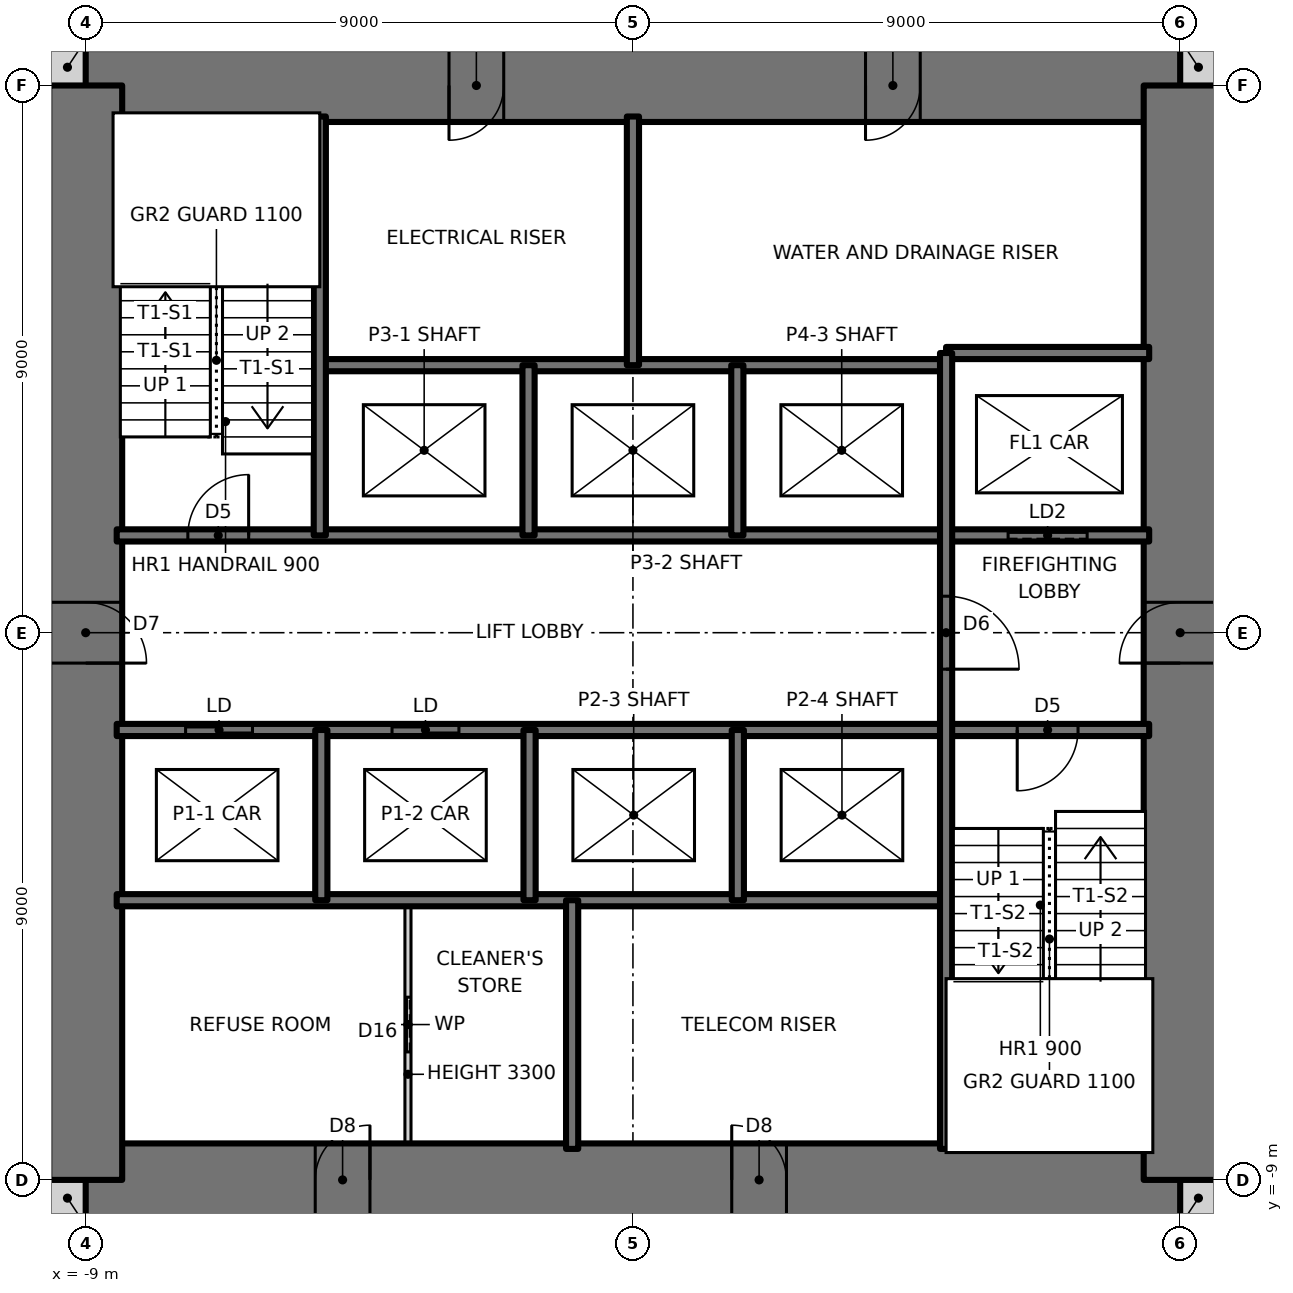
"""IFC4 building model, lengths in metres.
Left out: names, types, materials, properties, quantities, classifications, styles, units other than length and angle.
Written with IfcOpenShell. Run it as: python <this file> out.ifc"""

import sys

from ifc_helpers import new_model, si_unit, direction, frame, frame_2d, origin, place, context, subcontext, project, spatial, rectangle, extrude, element, fill, save


model = new_model("IFC4")
c1 = context("Model", 3, precision=1e-05, world=origin(), true_north=direction((0.0, 1.0)))
c2 = subcontext(c1, "Body", "Model", "MODEL_VIEW")
j1 = project(units=[si_unit("LENGTHUNIT", "METRE"), si_unit("PLANEANGLEUNIT", "RADIAN")], contexts=[c1])
p1 = place(None, origin())
s1 = spatial("IfcSite", under=j1, at=p1, CompositionType="ELEMENT")
p2 = place(p1, origin())
s2 = spatial("IfcBuilding", under=s1, at=p2, CompositionType="ELEMENT")
p3 = place(p2, frame((0.0, 0.0, 60.5)))
s3 = spatial("IfcBuildingStorey", under=s2, at=p3, CompositionType="ELEMENT", Elevation=60.5)
for number, where, z_axis, x_axis in (
    (1, (-9.6, -9.3, 0.0), (0.0, 0.0, 1.0), (1.0, 0.0, 0.0)),
    (2, (9.0, -9.3, 0.0), (0.0, 0.0, 1.0), (1.0, 0.0, 0.0)),
    (3, (9.0, 9.3, 0.0), (0.0, 0.0, 1.0), (1.0, 0.0, 0.0)),
    (4, (-9.6, 9.3, 0.0), (0.0, 0.0, 1.0), (1.0, 0.0, 0.0)),
):
    element("IfcWall", number, at=place(p3, frame(where, z_axis=z_axis, x_axis=x_axis)), inside=s3, PredefinedType="SOLIDWALL", context=c2, shape_type="SweptSolid", body=[
        extrude(rectangle(XDim=0.6, YDim=0.6, at=frame_2d((0.3, 0.0))), origin(), (0.0, 0.0, 1.0), 3.5),
    ])
p4 = place(p3, frame((-9.0, -9.0, 0.0), z_axis=(0.0, 0.0, 1.0), x_axis=(1.0, 0.0, 0.0)))
e5 = element("IfcWall", 5, at=p4, inside=s3, PredefinedType="SHEAR", context=c2, shape_type="SweptSolid", body=[
    extrude(rectangle(XDim=18.0, YDim=1.2, at=frame_2d((9.0, 0.0))), origin(), (0.0, 0.0, 1.0), 3.5),
])
p5 = place(p4, frame((3.775, 0.0, 0.0)))
e6 = element("IfcOpeningElement", 6, at=p5, cuts=e5, PredefinedType="OPENING", context=c2, shape_type="SweptSolid", body=[
    extrude(rectangle(XDim=0.9, YDim=2.1, at=frame_2d((0.45, 1.05))), frame((0.0, 0.61, 0.0), z_axis=(0.0, -1.0, 0.0), x_axis=(1.0, 0.0, 0.0)), (0.0, 0.0, 1.0), 1.22),
])
p6 = place(p4, frame((10.625, 0.0, 0.0)))
e7 = element("IfcOpeningElement", 7, at=p6, cuts=e5, PredefinedType="OPENING", context=c2, shape_type="SweptSolid", body=[
    extrude(rectangle(XDim=0.9, YDim=2.1, at=frame_2d((0.45, 1.05))), frame((0.0, 0.61, 0.0), z_axis=(0.0, -1.0, 0.0), x_axis=(1.0, 0.0, 0.0)), (0.0, 0.0, 1.0), 1.22),
])
p7 = place(p3, frame((9.0, 9.0, 0.0), z_axis=(0.0, 0.0, 1.0), x_axis=(-1.0, 0.0, 0.0)))
e8 = element("IfcWall", 8, at=p7, inside=s3, PredefinedType="SHEAR", context=c2, shape_type="SweptSolid", body=[
    extrude(rectangle(XDim=18.0, YDim=1.2, at=frame_2d((9.0, 0.0))), origin(), (0.0, 0.0, 1.0), 3.5),
])
p8 = place(p7, frame((11.125, 0.0, 0.0)))
e9 = element("IfcOpeningElement", 9, at=p8, cuts=e8, PredefinedType="OPENING", context=c2, shape_type="SweptSolid", body=[
    extrude(rectangle(XDim=0.9, YDim=2.1, at=frame_2d((0.45, 1.05))), frame((0.0, 0.61, 0.0), z_axis=(0.0, -1.0, 0.0), x_axis=(1.0, 0.0, 0.0)), (0.0, 0.0, 1.0), 1.22),
])
p9 = place(p7, frame((4.275, 0.0, 0.0)))
e10 = element("IfcOpeningElement", 10, at=p9, cuts=e8, PredefinedType="OPENING", context=c2, shape_type="SweptSolid", body=[
    extrude(rectangle(XDim=0.9, YDim=2.1, at=frame_2d((0.45, 1.05))), frame((0.0, 0.61, 0.0), z_axis=(0.0, -1.0, 0.0), x_axis=(1.0, 0.0, 0.0)), (0.0, 0.0, 1.0), 1.22),
])
p10 = place(p3, frame((9.0, -9.0, 0.0), z_axis=(0.0, 0.0, 1.0), x_axis=(0.0, 1.0, 0.0)))
e11 = element("IfcWall", 11, at=p10, inside=s3, PredefinedType="SHEAR", context=c2, shape_type="SweptSolid", body=[
    extrude(rectangle(XDim=18.0, YDim=1.2, at=frame_2d((9.0, 0.0))), origin(), (0.0, 0.0, 1.0), 3.5),
])
p11 = place(p10, frame((8.5, 0.0, 0.0)))
e12 = element("IfcOpeningElement", 12, at=p11, cuts=e11, PredefinedType="OPENING", context=c2, shape_type="SweptSolid", body=[
    extrude(rectangle(XDim=1.0, YDim=2.1, at=frame_2d((0.5, 1.05))), frame((0.0, 0.61, 0.0), z_axis=(0.0, -1.0, 0.0), x_axis=(1.0, 0.0, 0.0)), (0.0, 0.0, 1.0), 1.22),
])
p12 = place(p3, frame((-9.0, 9.0, 0.0), z_axis=(0.0, 0.0, 1.0), x_axis=(0.0, -1.0, 0.0)))
e13 = element("IfcWall", 13, at=p12, inside=s3, PredefinedType="SHEAR", context=c2, shape_type="SweptSolid", body=[
    extrude(rectangle(XDim=18.0, YDim=1.2, at=frame_2d((9.0, 0.0))), origin(), (0.0, 0.0, 1.0), 3.5),
])
p13 = place(p12, frame((8.5, 0.0, 0.0)))
e14 = element("IfcOpeningElement", 14, at=p13, cuts=e13, PredefinedType="OPENING", context=c2, shape_type="SweptSolid", body=[
    extrude(rectangle(XDim=1.0, YDim=2.1, at=frame_2d((0.5, 1.05))), frame((0.0, 0.61, 0.0), z_axis=(0.0, -1.0, 0.0), x_axis=(1.0, 0.0, 0.0)), (0.0, 0.0, 1.0), 1.22),
])
p14 = place(p3, frame((-8.49, -4.4, 0.0), z_axis=(0.0, 0.0, 1.0), x_axis=(1.0, 0.0, 0.0)))
e15 = element("IfcWall", 15, at=p14, inside=s3, PredefinedType="SOLIDWALL", context=c2, shape_type="SweptSolid", body=[
    extrude(rectangle(XDim=13.64, YDim=0.2, at=frame_2d((6.82, 0.0))), origin(), (0.0, 0.0, 1.0), 3.5),
])
p15 = place(p3, frame((-8.49, -1.6, 0.0), z_axis=(0.0, 0.0, 1.0), x_axis=(1.0, 0.0, 0.0)))
e16 = element("IfcWall", 16, at=p15, inside=s3, PredefinedType="SOLIDWALL", context=c2, shape_type="SweptSolid", body=[
    extrude(rectangle(XDim=16.98, YDim=0.2, at=frame_2d((8.49, 0.0))), origin(), (0.0, 0.0, 1.0), 3.5),
])
p16 = place(p15, frame((14.81, 0.0, 0.0)))
e17 = element("IfcOpeningElement", 17, at=p16, cuts=e16, PredefinedType="OPENING", context=c2, shape_type="SweptSolid", body=[
    extrude(rectangle(XDim=1.0, YDim=2.1, at=frame_2d((0.5, 1.05))), frame((0.0, 0.11, 0.0), z_axis=(0.0, -1.0, 0.0), x_axis=(1.0, 0.0, 0.0)), (0.0, 0.0, 1.0), 0.22),
])
p17 = place(p15, frame((1.133, 0.0, 0.0)))
e18 = element("IfcOpeningElement", 18, at=p17, cuts=e16, PredefinedType="OPENING", context=c2, shape_type="SweptSolid", body=[
    extrude(rectangle(XDim=1.1, YDim=2.1, at=frame_2d((0.55, 1.05))), frame((0.0, 0.11, 0.0), z_axis=(0.0, -1.0, 0.0), x_axis=(1.0, 0.0, 0.0)), (0.0, 0.0, 1.0), 0.22),
])
p18 = place(p15, frame((4.528, 0.0, 0.0)))
e19 = element("IfcOpeningElement", 19, at=p18, cuts=e16, PredefinedType="OPENING", context=c2, shape_type="SweptSolid", body=[
    extrude(rectangle(XDim=1.1, YDim=2.1, at=frame_2d((0.55, 1.05))), frame((0.0, 0.11, 0.0), z_axis=(0.0, -1.0, 0.0), x_axis=(1.0, 0.0, 0.0)), (0.0, 0.0, 1.0), 0.22),
])
p19 = place(p3, frame((-8.49, 1.6, 0.0), z_axis=(0.0, 0.0, 1.0), x_axis=(1.0, 0.0, 0.0)))
e20 = element("IfcWall", 20, at=p19, inside=s3, PredefinedType="SOLIDWALL", context=c2, shape_type="SweptSolid", body=[
    extrude(rectangle(XDim=16.98, YDim=0.2, at=frame_2d((8.49, 0.0))), origin(), (0.0, 0.0, 1.0), 3.5),
])
p20 = place(p19, frame((1.17, 0.0, 0.0)))
e21 = element("IfcOpeningElement", 21, at=p20, cuts=e20, PredefinedType="OPENING", context=c2, shape_type="SweptSolid", body=[
    extrude(rectangle(XDim=1.0, YDim=2.1, at=frame_2d((0.5, 1.05))), frame((0.0, 0.11, 0.0), z_axis=(0.0, -1.0, 0.0), x_axis=(1.0, 0.0, 0.0)), (0.0, 0.0, 1.0), 0.22),
])
p21 = place(p19, frame((14.66, 0.0, 0.0)))
e22 = element("IfcOpeningElement", 22, at=p21, cuts=e20, PredefinedType="OPENING", context=c2, shape_type="SweptSolid", body=[
    extrude(rectangle(XDim=1.3, YDim=2.1, at=frame_2d((0.65, 1.05))), frame((0.0, 0.11, 0.0), z_axis=(0.0, -1.0, 0.0), x_axis=(1.0, 0.0, 0.0)), (0.0, 0.0, 1.0), 0.22),
])
p22 = place(p3, frame((-5.15, 4.4, 0.0), z_axis=(0.0, 0.0, 1.0), x_axis=(1.0, 0.0, 0.0)))
e23 = element("IfcWall", 23, at=p22, inside=s3, PredefinedType="SOLIDWALL", context=c2, shape_type="SweptSolid", body=[
    extrude(rectangle(XDim=10.3, YDim=0.2, at=frame_2d((5.15, 0.0))), origin(), (0.0, 0.0, 1.0), 3.5),
])
p23 = place(p3, frame((5.15, 4.6, 0.0), z_axis=(0.0, 0.0, 1.0), x_axis=(1.0, 0.0, 0.0)))
e24 = element("IfcWall", 24, at=p23, inside=s3, PredefinedType="SOLIDWALL", context=c2, shape_type="SweptSolid", body=[
    extrude(rectangle(XDim=3.34, YDim=0.2, at=frame_2d((1.67, 0.0))), origin(), (0.0, 0.0, 1.0), 3.5),
])
p24 = place(p3, frame((5.15, -8.49, 0.0), z_axis=(0.0, 0.0, 1.0), x_axis=(0.0, 1.0, 0.0)))
e25 = element("IfcWall", 25, at=p24, inside=s3, PredefinedType="SOLIDWALL", context=c2, shape_type="SweptSolid", body=[
    extrude(rectangle(XDim=13.09, YDim=0.2, at=frame_2d((6.545, 0.0))), origin(), (0.0, 0.0, 1.0), 3.5),
])
p25 = place(p24, frame((7.89, 0.0, 0.0)))
e26 = element("IfcOpeningElement", 26, at=p25, cuts=e25, PredefinedType="OPENING", context=c2, shape_type="SweptSolid", body=[
    extrude(rectangle(XDim=1.2, YDim=2.1, at=frame_2d((0.6, 1.05))), frame((0.0, 0.11, 0.0), z_axis=(0.0, -1.0, 0.0), x_axis=(1.0, 0.0, 0.0)), (0.0, 0.0, 1.0), 0.22),
])
for number, where, z_axis, x_axis in (
    (27, (1.725, -4.4, 0.0), (0.0, 0.0, 1.0), (0.0, 1.0, 0.0)),
    (28, (1.717, 1.6, 0.0), (0.0, 0.0, 1.0), (0.0, 1.0, 0.0)),
):
    element("IfcWall", number, at=place(p3, frame(where, z_axis=z_axis, x_axis=x_axis)), inside=s3, PredefinedType="SOLIDWALL", context=c2, shape_type="SweptSolid", body=[
        extrude(rectangle(XDim=2.8, YDim=0.2, at=frame_2d((1.4, 0.0))), origin(), (0.0, 0.0, 1.0), 3.5),
    ])
for number, where, z_axis, x_axis in (
    (29, (0.0, 4.4, 0.0), (0.0, 0.0, 1.0), (0.0, 1.0, 0.0)),
    (30, (-1.0, -8.49, 0.0), (0.0, 0.0, 1.0), (0.0, 1.0, 0.0)),
):
    element("IfcWall", number, at=place(p3, frame(where, z_axis=z_axis, x_axis=x_axis)), inside=s3, PredefinedType="SOLIDWALL", context=c2, shape_type="SweptSolid", body=[
        extrude(rectangle(XDim=4.09, YDim=0.2, at=frame_2d((2.045, 0.0))), origin(), (0.0, 0.0, 1.0), 3.5),
    ])
for number, where, z_axis, x_axis in (
    (31, (-1.7, -4.4, 0.0), (0.0, 0.0, 1.0), (0.0, 1.0, 0.0)),
    (32, (-1.717, 1.6, 0.0), (0.0, 0.0, 1.0), (0.0, 1.0, 0.0)),
):
    element("IfcWall", number, at=place(p3, frame(where, z_axis=z_axis, x_axis=x_axis)), inside=s3, PredefinedType="SOLIDWALL", context=c2, shape_type="SweptSolid", body=[
        extrude(rectangle(XDim=2.8, YDim=0.2, at=frame_2d((1.4, 0.0))), origin(), (0.0, 0.0, 1.0), 3.5),
    ])
p26 = place(p3, frame((-3.7, -8.49, 0.0), z_axis=(0.0, 0.0, 1.0), x_axis=(0.0, 1.0, 0.0)))
e33 = element("IfcWall", 33, at=p26, inside=s3, PredefinedType="PARTITIONING", context=c2, shape_type="SweptSolid", body=[
    extrude(rectangle(XDim=4.09, YDim=0.1, at=frame_2d((2.045, 0.0))), origin(), (0.0, 0.0, 1.0), 3.3),
])
p27 = place(p26, frame((1.595, 0.0, 0.0)))
e34 = element("IfcOpeningElement", 34, at=p27, cuts=e33, PredefinedType="OPENING", context=c2, shape_type="SweptSolid", body=[
    extrude(rectangle(XDim=0.9, YDim=2.1, at=frame_2d((0.45, 1.05))), frame((0.0, 0.06, 0.0), z_axis=(0.0, -1.0, 0.0), x_axis=(1.0, 0.0, 0.0)), (0.0, 0.0, 1.0), 0.12),
])
p28 = place(p3, frame((-5.125, -4.4, 0.0), z_axis=(0.0, 0.0, 1.0), x_axis=(0.0, 1.0, 0.0)))
e35 = element("IfcWall", 35, at=p28, inside=s3, PredefinedType="SOLIDWALL", context=c2, shape_type="SweptSolid", body=[
    extrude(rectangle(XDim=2.8, YDim=0.2, at=frame_2d((1.4, 0.0))), origin(), (0.0, 0.0, 1.0), 3.5),
])
p29 = place(p3, frame((-5.15, 1.6, 0.0), z_axis=(0.0, 0.0, 1.0), x_axis=(0.0, 1.0, 0.0)))
e36 = element("IfcWall", 36, at=p29, inside=s3, PredefinedType="SOLIDWALL", context=c2, shape_type="SweptSolid", body=[
    extrude(rectangle(XDim=6.89, YDim=0.2, at=frame_2d((3.445, 0.0))), origin(), (0.0, 0.0, 1.0), 3.5),
])
p30 = place(p20, origin())
e37 = element("IfcDoor", 37, at=p30, inside=s3, OperationType="SINGLE_SWING_RIGHT", PredefinedType="DOOR", context=c2, shape_type="SweptSolid", body=[
    extrude(rectangle(XDim=1.0, YDim=2.1, at=frame_2d((0.5, 1.05))), frame((0.0, 0.025, 0.0), z_axis=(0.0, -1.0, 0.0), x_axis=(1.0, 0.0, 0.0)), (0.0, 0.0, 1.0), 0.05),
])
fill(e21, e37)
p31 = place(p16, frame((1.0, 0.0, 0.0), z_axis=(0.0, 0.0, 1.0), x_axis=(-1.0, 0.0, 0.0)))
e38 = element("IfcDoor", 38, at=p31, inside=s3, OperationType="SINGLE_SWING_RIGHT", PredefinedType="DOOR", context=c2, shape_type="SweptSolid", body=[
    extrude(rectangle(XDim=1.0, YDim=2.1, at=frame_2d((0.5, 1.05))), frame((0.0, 0.025, 0.0), z_axis=(0.0, -1.0, 0.0), x_axis=(1.0, 0.0, 0.0)), (0.0, 0.0, 1.0), 0.05),
])
fill(e17, e38)
p32 = place(p25, frame((1.2, 0.0, 0.0), z_axis=(0.0, 0.0, 1.0), x_axis=(-1.0, 0.0, 0.0)))
e39 = element("IfcDoor", 39, at=p32, inside=s3, OperationType="SINGLE_SWING_RIGHT", PredefinedType="DOOR", context=c2, shape_type="SweptSolid", body=[
    extrude(rectangle(XDim=1.2, YDim=2.1, at=frame_2d((0.6, 1.05))), frame((0.0, 0.025, 0.0), z_axis=(0.0, -1.0, 0.0), x_axis=(1.0, 0.0, 0.0)), (0.0, 0.0, 1.0), 0.05),
])
fill(e26, e39)
p33 = place(p27, origin())
e40 = element("IfcDoor", 40, at=p33, inside=s3, OperationType="SLIDING_TO_LEFT", PredefinedType="DOOR", context=c2, shape_type="SweptSolid", body=[
    extrude(rectangle(XDim=0.9, YDim=2.1, at=frame_2d((0.45, 1.05))), frame((0.0, 0.025, 0.0), z_axis=(0.0, -1.0, 0.0), x_axis=(1.0, 0.0, 0.0)), (0.0, 0.0, 1.0), 0.05),
])
fill(e34, e40)
p34 = place(p13, origin())
e41 = element("IfcDoor", 41, at=p34, inside=s3, OperationType="SINGLE_SWING_RIGHT", PredefinedType="DOOR", context=c2, shape_type="SweptSolid", body=[
    extrude(rectangle(XDim=1.0, YDim=2.1, at=frame_2d((0.5, 1.05))), frame((0.0, 0.025, 0.0), z_axis=(0.0, -1.0, 0.0), x_axis=(1.0, 0.0, 0.0)), (0.0, 0.0, 1.0), 0.05),
])
fill(e14, e41)
p35 = place(p11, origin())
e42 = element("IfcDoor", 42, at=p35, inside=s3, OperationType="SINGLE_SWING_LEFT", PredefinedType="DOOR", context=c2, shape_type="SweptSolid", body=[
    extrude(rectangle(XDim=1.0, YDim=2.1, at=frame_2d((0.5, 1.05))), frame((0.0, 0.025, 0.0), z_axis=(0.0, -1.0, 0.0), x_axis=(1.0, 0.0, 0.0)), (0.0, 0.0, 1.0), 0.05),
])
fill(e12, e42)
p36 = place(p8, origin())
e43 = element("IfcDoor", 43, at=p36, inside=s3, OperationType="SINGLE_SWING_RIGHT", PredefinedType="DOOR", context=c2, shape_type="SweptSolid", body=[
    extrude(rectangle(XDim=0.9, YDim=2.1, at=frame_2d((0.45, 1.05))), frame((0.0, 0.025, 0.0), z_axis=(0.0, -1.0, 0.0), x_axis=(1.0, 0.0, 0.0)), (0.0, 0.0, 1.0), 0.05),
])
fill(e9, e43)
p37 = place(p9, origin())
e44 = element("IfcDoor", 44, at=p37, inside=s3, OperationType="SINGLE_SWING_RIGHT", PredefinedType="DOOR", context=c2, shape_type="SweptSolid", body=[
    extrude(rectangle(XDim=0.9, YDim=2.1, at=frame_2d((0.45, 1.05))), frame((0.0, 0.025, 0.0), z_axis=(0.0, -1.0, 0.0), x_axis=(1.0, 0.0, 0.0)), (0.0, 0.0, 1.0), 0.05),
])
fill(e10, e44)
p38 = place(p5, origin())
e45 = element("IfcDoor", 45, at=p38, inside=s3, OperationType="SINGLE_SWING_RIGHT", PredefinedType="DOOR", context=c2, shape_type="SweptSolid", body=[
    extrude(rectangle(XDim=0.9, YDim=2.1, at=frame_2d((0.45, 1.05))), frame((0.0, 0.025, 0.0), z_axis=(0.0, -1.0, 0.0), x_axis=(1.0, 0.0, 0.0)), (0.0, 0.0, 1.0), 0.05),
])
fill(e6, e45)
p39 = place(p6, origin())
e46 = element("IfcDoor", 46, at=p39, inside=s3, OperationType="SINGLE_SWING_LEFT", PredefinedType="DOOR", context=c2, shape_type="SweptSolid", body=[
    extrude(rectangle(XDim=0.9, YDim=2.1, at=frame_2d((0.45, 1.05))), frame((0.0, 0.025, 0.0), z_axis=(0.0, -1.0, 0.0), x_axis=(1.0, 0.0, 0.0)), (0.0, 0.0, 1.0), 0.05),
])
fill(e7, e46)
p40 = place(p17, origin())
e47 = element("IfcDoor", 47, at=p40, inside=s3, OperationType="DOUBLE_DOOR_SLIDING", PredefinedType="DOOR", context=c2, shape_type="SweptSolid", body=[
    extrude(rectangle(XDim=1.1, YDim=2.1, at=frame_2d((0.55, 1.05))), frame((0.0, 0.025, 0.0), z_axis=(0.0, -1.0, 0.0), x_axis=(1.0, 0.0, 0.0)), (0.0, 0.0, 1.0), 0.05),
])
fill(e18, e47)
p41 = place(p18, origin())
e48 = element("IfcDoor", 48, at=p41, inside=s3, OperationType="DOUBLE_DOOR_SLIDING", PredefinedType="DOOR", context=c2, shape_type="SweptSolid", body=[
    extrude(rectangle(XDim=1.1, YDim=2.1, at=frame_2d((0.55, 1.05))), frame((0.0, 0.025, 0.0), z_axis=(0.0, -1.0, 0.0), x_axis=(1.0, 0.0, 0.0)), (0.0, 0.0, 1.0), 0.05),
])
fill(e19, e48)
p42 = place(p21, origin())
e49 = element("IfcDoor", 49, at=p42, inside=s3, OperationType="SLIDING_TO_LEFT", PredefinedType="DOOR", context=c2, shape_type="SweptSolid", body=[
    extrude(rectangle(XDim=1.3, YDim=2.1, at=frame_2d((0.65, 1.05))), frame((0.0, 0.025, 0.0), z_axis=(0.0, -1.0, 0.0), x_axis=(1.0, 0.0, 0.0)), (0.0, 0.0, 1.0), 0.05),
])
fill(e22, e49)
save(model, sys.argv[1])
